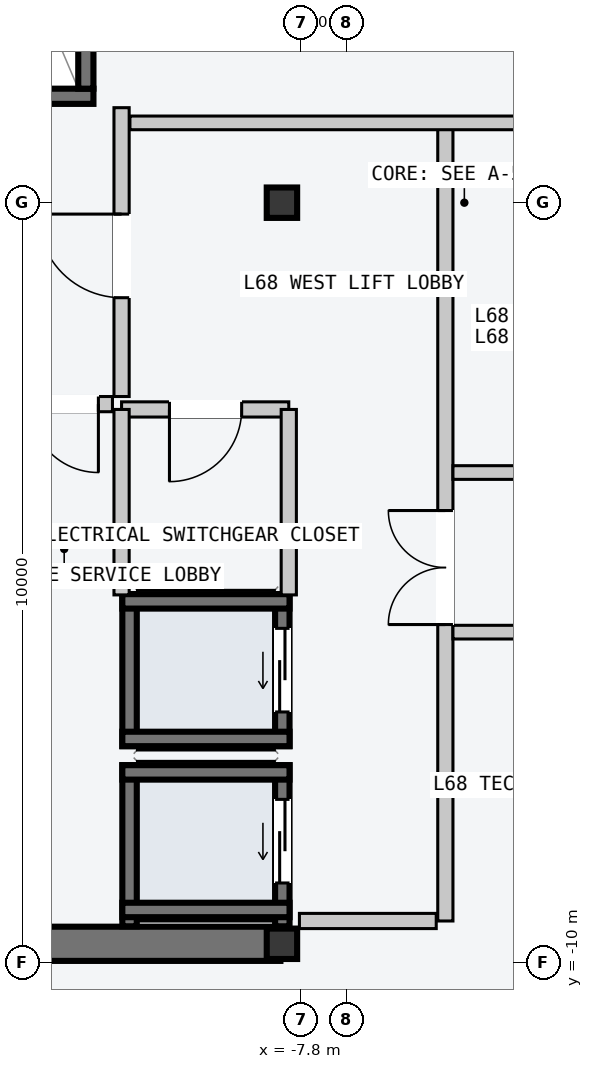
"""IFC4 building model, lengths in metres.
Left out: names, types, materials, properties, quantities, classifications, styles, units other than length and angle.
Written with IfcOpenShell. Run it as: python <this file> out.ifc"""

import sys

from ifc_helpers import new_model, si_unit, direction, frame, frame_2d, origin, origin_2d, place, context, subcontext, project, spatial, rectangle, i_section, extrude, element, fill, save


model = new_model("IFC4")
c1 = context("Model", 3, precision=1e-05, world=origin(), true_north=direction((0.0, 1.0)))
c2 = subcontext(c1, "Body", "Model", "MODEL_VIEW")
j1 = project(units=[si_unit("LENGTHUNIT", "METRE"), si_unit("PLANEANGLEUNIT", "RADIAN")], contexts=[c1])
p1 = place(None, origin())
s1 = spatial("IfcSite", under=j1, at=p1, CompositionType="ELEMENT")
p2 = place(p1, origin())
s2 = spatial("IfcBuilding", under=s1, at=p2, CompositionType="ELEMENT")
p3 = place(p2, frame((0.0, 0.0, 258.0)))
s3 = spatial("IfcBuildingStorey", under=s2, at=p3, CompositionType="ELEMENT", Elevation=258.0)
p4 = place(p3, frame((-14.53, -9.75, -0.2), z_axis=(0.0, 0.0, 1.0), x_axis=(1.0, 0.0, 0.0)))
e1 = element("IfcWall", 1, at=p4, inside=s3, PredefinedType="SHEAR", context=c2, shape_type="SweptSolid", body=[
    extrude(rectangle(XDim=6.46, YDim=0.45, at=frame_2d((3.23, 0.0))), origin(), (0.0, 0.0, 1.0), 3.6),
])
p5 = place(p3, frame((-14.25, 1.4, -0.2), z_axis=(0.0, 0.0, 1.0), x_axis=(1.0, 0.0, 0.0)))
e2 = element("IfcWall", 2, at=p5, inside=s3, PredefinedType="SOLIDWALL", context=c2, shape_type="SweptSolid", body=[
    extrude(rectangle(XDim=3.72, YDim=0.2, at=frame_2d((1.86, 0.0))), origin(), (0.0, 0.0, 1.0), 3.6),
])
p6 = place(p5, frame((1.5, 0.0, 0.2)))
e3 = element("IfcOpeningElement", 3, at=p6, cuts=e2, PredefinedType="OPENING", context=c2, shape_type="SweptSolid", body=[
    extrude(rectangle(XDim=1.12, YDim=2.18, at=frame_2d((0.56, 1.09))), frame((0.0, 0.11, 0.0), z_axis=(0.0, -1.0, 0.0), x_axis=(1.0, 0.0, 0.0)), (0.0, 0.0, 1.0), 0.22),
])
p7 = place(p3, frame((-10.63, 1.5, -0.2), z_axis=(0.0, 0.0, 1.0), x_axis=(0.0, 1.0, 0.0)))
e4 = element("IfcWall", 4, at=p7, inside=s3, PredefinedType="SOLIDWALL", context=c2, shape_type="SweptSolid", body=[
    extrude(rectangle(XDim=7.8, YDim=0.2, at=frame_2d((3.9, 0.0))), origin(), (0.0, 0.0, 1.0), 3.6),
])
for number, where, z_axis, x_axis in (
    (5, (-8.05, -9.75, 0.0), (0.0, 0.0, 1.0), (1.0, 0.0, 0.0)),
    (6, (-8.05, 0.0, 0.0), (0.0, 0.0, 1.0), (1.0, 0.0, 0.0)),
):
    element("IfcColumn", number, at=place(p3, frame(where, z_axis=z_axis, x_axis=x_axis)), inside=s3, PredefinedType="COLUMN", context=c2, shape_type="SweptSolid", body=[
        extrude(i_section(OverallWidth=0.4, OverallDepth=0.4, WebThickness=0.013, FlangeThickness=0.021, at=origin_2d()), origin(), (0.0, 0.0, 1.0), 3.6),
    ])
p8 = place(p3, frame((-8.045, -9.52, -0.2), z_axis=(0.0, 0.0, 1.0), x_axis=(0.0, 1.0, 0.0)))
e7 = element("IfcWall", 7, at=p8, inside=s3, PredefinedType="SOLIDWALL", context=c2, shape_type="SweptSolid", body=[
    extrude(rectangle(XDim=2.12, YDim=0.19, at=frame_2d((1.06, 0.0))), origin(), (0.0, 0.0, 1.0), 3.6),
])
p9 = place(p8, frame((0.57, 0.0, 0.2)))
e8 = element("IfcOpeningElement", 8, at=p9, cuts=e7, PredefinedType="OPENING", context=c2, shape_type="SweptSolid", body=[
    extrude(rectangle(XDim=1.1, YDim=2.2, at=frame_2d((0.55, 1.1))), frame((0.0, 0.105, 0.0), z_axis=(0.0, -1.0, 0.0), x_axis=(1.0, 0.0, 0.0)), (0.0, 0.0, 1.0), 0.21),
])
p10 = place(p3, frame((-10.055, -9.52, -0.2), z_axis=(0.0, 0.0, 1.0), x_axis=(0.0, 1.0, 0.0)))
e9 = element("IfcWall", 9, at=p10, inside=s3, PredefinedType="SOLIDWALL", context=c2, shape_type="SweptSolid", body=[
    extrude(rectangle(XDim=2.12, YDim=0.19, at=frame_2d((1.06, 0.0))), origin(), (0.0, 0.0, 1.0), 3.6),
])
for number, where, z_axis, x_axis in (
    (10, (-10.15, -7.495, -0.2), (0.0, 0.0, 1.0), (1.0, 0.0, 0.0)),
    (11, (-10.15, -9.305, -0.2), (0.0, 0.0, 1.0), (1.0, 0.0, 0.0)),
):
    element("IfcWall", number, at=place(p3, frame(where, z_axis=z_axis, x_axis=x_axis)), inside=s3, PredefinedType="SOLIDWALL", context=c2, shape_type="SweptSolid", body=[
        extrude(rectangle(XDim=2.2, YDim=0.19, at=frame_2d((1.1, 0.0))), origin(), (0.0, 0.0, 1.0), 3.6),
    ])
p11 = place(p3, frame((-8.045, -7.15, -0.2), z_axis=(0.0, 0.0, 1.0), x_axis=(0.0, 1.0, 0.0)))
e12 = element("IfcWall", 12, at=p11, inside=s3, PredefinedType="SOLIDWALL", context=c2, shape_type="SweptSolid", body=[
    extrude(rectangle(XDim=2.0, YDim=0.19, at=frame_2d((1.0, 0.0))), origin(), (0.0, 0.0, 1.0), 3.6),
])
p12 = place(p11, frame((0.45, 0.0, 0.2)))
e13 = element("IfcOpeningElement", 13, at=p12, cuts=e12, PredefinedType="OPENING", context=c2, shape_type="SweptSolid", body=[
    extrude(rectangle(XDim=1.1, YDim=2.2, at=frame_2d((0.55, 1.1))), frame((0.0, 0.105, 0.0), z_axis=(0.0, -1.0, 0.0), x_axis=(1.0, 0.0, 0.0)), (0.0, 0.0, 1.0), 0.21),
])
p13 = place(p3, frame((-10.055, -7.15, -0.2), z_axis=(0.0, 0.0, 1.0), x_axis=(0.0, 1.0, 0.0)))
e14 = element("IfcWall", 14, at=p13, inside=s3, PredefinedType="SOLIDWALL", context=c2, shape_type="SweptSolid", body=[
    extrude(rectangle(XDim=2.0, YDim=0.19, at=frame_2d((1.0, 0.0))), origin(), (0.0, 0.0, 1.0), 3.6),
])
for number, where, z_axis, x_axis in (
    (15, (-10.15, -5.245, -0.2), (0.0, 0.0, 1.0), (1.0, 0.0, 0.0)),
    (16, (-10.15, -7.055, -0.2), (0.0, 0.0, 1.0), (1.0, 0.0, 0.0)),
):
    element("IfcWall", number, at=place(p3, frame(where, z_axis=z_axis, x_axis=x_axis)), inside=s3, PredefinedType="SOLIDWALL", context=c2, shape_type="SweptSolid", body=[
        extrude(rectangle(XDim=2.2, YDim=0.19, at=frame_2d((1.1, 0.0))), origin(), (0.0, 0.0, 1.0), 3.6),
    ])
p14 = place(p3, frame((-5.9, -9.45, 0.0), z_axis=(0.0, 0.0, 1.0), x_axis=(0.0, 1.0, 0.0)))
e17 = element("IfcWall", 17, at=p14, inside=s3, PredefinedType="PARTITIONING", context=c2, shape_type="SweptSolid", body=[
    extrude(rectangle(XDim=10.5, YDim=0.2, at=frame_2d((5.25, 0.0))), origin(), (0.0, 0.0, 1.0), 3.4),
])
p15 = place(p14, frame((3.9, 0.0, 0.0)))
e18 = element("IfcOpeningElement", 18, at=p15, cuts=e17, PredefinedType="OPENING", context=c2, shape_type="SweptSolid", body=[
    extrude(rectangle(XDim=1.5, YDim=2.2, at=frame_2d((0.75, 1.1))), frame((0.0, 0.11, 0.0), z_axis=(0.0, -1.0, 0.0), x_axis=(1.0, 0.0, 0.0)), (0.0, 0.0, 1.0), 0.22),
])
p16 = place(p3, frame((-6.02, -9.45, 0.0), z_axis=(0.0, 0.0, 1.0), x_axis=(-1.0, 0.0, 0.0)))
e19 = element("IfcWall", 19, at=p16, inside=s3, PredefinedType="PARTITIONING", context=c2, shape_type="SweptSolid", body=[
    extrude(rectangle(XDim=1.8, YDim=0.2, at=frame_2d((0.9, 0.0))), origin(), (0.0, 0.0, 1.0), 3.4),
])
p17 = place(p3, frame((-10.16, -2.55, 0.0), z_axis=(0.0, 0.0, 1.0), x_axis=(0.0, 1.0, 0.0)))
e20 = element("IfcWall", 20, at=p17, inside=s3, PredefinedType="PARTITIONING", context=c2, shape_type="SweptSolid", body=[
    extrude(rectangle(XDim=3.8, YDim=0.2, at=frame_2d((1.9, 0.0))), origin(), (0.0, 0.0, 1.0), 3.4),
])
p18 = place(p17, frame((1.3, 0.0, 0.0)))
e21 = element("IfcOpeningElement", 21, at=p18, cuts=e20, PredefinedType="OPENING", context=c2, shape_type="SweptSolid", body=[
    extrude(rectangle(XDim=1.1, YDim=2.15, at=frame_2d((0.55, 1.075))), frame((0.0, 0.11, 0.0), z_axis=(0.0, -1.0, 0.0), x_axis=(1.0, 0.0, 0.0)), (0.0, 0.0, 1.0), 0.22),
])
p19 = place(p3, frame((-10.28, -2.65, 0.0), z_axis=(0.0, 0.0, 1.0), x_axis=(-1.0, 0.0, 0.0)))
e22 = element("IfcWall", 22, at=p19, inside=s3, PredefinedType="PARTITIONING", context=c2, shape_type="SweptSolid", body=[
    extrude(rectangle(XDim=1.27, YDim=0.2, at=frame_2d((0.635, 0.0))), origin(), (0.0, 0.0, 1.0), 3.4),
])
p20 = place(p19, frame((0.185, 0.0, 0.0)))
e23 = element("IfcOpeningElement", 23, at=p20, cuts=e22, PredefinedType="OPENING", context=c2, shape_type="SweptSolid", body=[
    extrude(rectangle(XDim=0.9, YDim=2.15, at=frame_2d((0.45, 1.075))), frame((0.0, 0.11, 0.0), z_axis=(0.0, -1.0, 0.0), x_axis=(1.0, 0.0, 0.0)), (0.0, 0.0, 1.0), 0.22),
])
p21 = place(p3, frame((-7.96, -2.72, 0.0), z_axis=(0.0, 0.0, 1.0), x_axis=(-1.0, 0.0, 0.0)))
e24 = element("IfcWall", 24, at=p21, inside=s3, PredefinedType="PARTITIONING", context=c2, shape_type="SweptSolid", body=[
    extrude(rectangle(XDim=2.2, YDim=0.2, at=frame_2d((1.1, 0.0))), origin(), (0.0, 0.0, 1.0), 3.4),
])
p22 = place(p21, frame((0.62, 0.0, 0.0)))
e25 = element("IfcOpeningElement", 25, at=p22, cuts=e24, PredefinedType="OPENING", context=c2, shape_type="SweptSolid", body=[
    extrude(rectangle(XDim=0.95, YDim=2.1, at=frame_2d((0.475, 1.05))), frame((0.0, 0.11, 0.0), z_axis=(0.0, -1.0, 0.0), x_axis=(1.0, 0.0, 0.0)), (0.0, 0.0, 1.0), 0.22),
])
for number, where, z_axis, x_axis in (
    (26, (-7.96, -5.16, 0.0), (0.0, 0.0, 1.0), (0.0, 1.0, 0.0)),
    (27, (-10.16, -5.16, 0.0), (0.0, 0.0, 1.0), (0.0, 1.0, 0.0)),
):
    element("IfcWall", number, at=place(p3, frame(where, z_axis=z_axis, x_axis=x_axis)), inside=s3, PredefinedType="PARTITIONING", context=c2, shape_type="SweptSolid", body=[
        extrude(rectangle(XDim=2.44, YDim=0.2, at=frame_2d((1.22, 0.0))), origin(), (0.0, 0.0, 1.0), 3.4),
    ])
p23 = place(p3, frame((-10.05, 1.05, 0.0), z_axis=(0.0, 0.0, 1.0), x_axis=(1.0, 0.0, 0.0)))
e28 = element("IfcWall", 28, at=p23, inside=s3, PredefinedType="PARTITIONING", context=c2, shape_type="SweptSolid", body=[
    extrude(rectangle(XDim=8.79, YDim=0.18, at=frame_2d((4.395, 0.0))), origin(), (0.0, 0.0, 1.0), 3.4),
])
for number, where, z_axis, x_axis in (
    (29, (-5.8, -3.55, 0.0), (0.0, 0.0, 1.0), (1.0, 0.0, 0.0)),
    (30, (-5.8, -5.65, 0.0), (0.0, 0.0, 1.0), (1.0, 0.0, 0.0)),
):
    element("IfcWall", number, at=place(p3, frame(where, z_axis=z_axis, x_axis=x_axis)), inside=s3, PredefinedType="PARTITIONING", context=c2, shape_type="SweptSolid", body=[
        extrude(rectangle(XDim=4.54, YDim=0.18, at=frame_2d((2.27, 0.0))), origin(), (0.0, 0.0, 1.0), 3.4),
    ])
p24 = place(p9, origin())
e31 = element("IfcDoor", 31, at=p24, inside=s3, OperationType="SLIDING_TO_LEFT", PredefinedType="DOOR", context=c2, shape_type="SweptSolid", body=[
    extrude(rectangle(XDim=1.1, YDim=2.2, at=frame_2d((0.55, 1.1))), frame((0.0, 0.025, 0.0), z_axis=(0.0, -1.0, 0.0), x_axis=(1.0, 0.0, 0.0)), (0.0, 0.0, 1.0), 0.05),
])
fill(e8, e31)
p25 = place(p12, origin())
e32 = element("IfcDoor", 32, at=p25, inside=s3, OperationType="SLIDING_TO_LEFT", PredefinedType="DOOR", context=c2, shape_type="SweptSolid", body=[
    extrude(rectangle(XDim=1.1, YDim=2.2, at=frame_2d((0.55, 1.1))), frame((0.0, 0.025, 0.0), z_axis=(0.0, -1.0, 0.0), x_axis=(1.0, 0.0, 0.0)), (0.0, 0.0, 1.0), 0.05),
])
fill(e13, e32)
p26 = place(p15, origin())
e33 = element("IfcDoor", 33, at=p26, inside=s3, OperationType="DOUBLE_DOOR_SINGLE_SWING", PredefinedType="DOOR", context=c2, shape_type="SweptSolid", body=[
    extrude(rectangle(XDim=1.5, YDim=2.2, at=frame_2d((0.75, 1.1))), frame((0.0, 0.025, 0.0), z_axis=(0.0, -1.0, 0.0), x_axis=(1.0, 0.0, 0.0)), (0.0, 0.0, 1.0), 0.05),
])
fill(e18, e33)
p27 = place(p18, origin())
e34 = element("IfcDoor", 34, at=p27, inside=s3, OperationType="SINGLE_SWING_RIGHT", PredefinedType="DOOR", context=c2, shape_type="SweptSolid", body=[
    extrude(rectangle(XDim=1.1, YDim=2.15, at=frame_2d((0.55, 1.075))), frame((0.0, 0.025, 0.0), z_axis=(0.0, -1.0, 0.0), x_axis=(1.0, 0.0, 0.0)), (0.0, 0.0, 1.0), 0.05),
])
fill(e21, e34)
p28 = place(p20, origin())
e35 = element("IfcDoor", 35, at=p28, inside=s3, OperationType="SINGLE_SWING_LEFT", PredefinedType="DOOR", context=c2, shape_type="SweptSolid", body=[
    extrude(rectangle(XDim=0.9, YDim=2.15, at=frame_2d((0.45, 1.075))), frame((0.0, 0.025, 0.0), z_axis=(0.0, -1.0, 0.0), x_axis=(1.0, 0.0, 0.0)), (0.0, 0.0, 1.0), 0.05),
])
fill(e23, e35)
p29 = place(p22, origin())
e36 = element("IfcDoor", 36, at=p29, inside=s3, OperationType="SINGLE_SWING_RIGHT", PredefinedType="DOOR", context=c2, shape_type="SweptSolid", body=[
    extrude(rectangle(XDim=0.95, YDim=2.1, at=frame_2d((0.475, 1.05))), frame((0.0, 0.025, 0.0), z_axis=(0.0, -1.0, 0.0), x_axis=(1.0, 0.0, 0.0)), (0.0, 0.0, 1.0), 0.05),
])
fill(e25, e36)
save(model, sys.argv[1])
